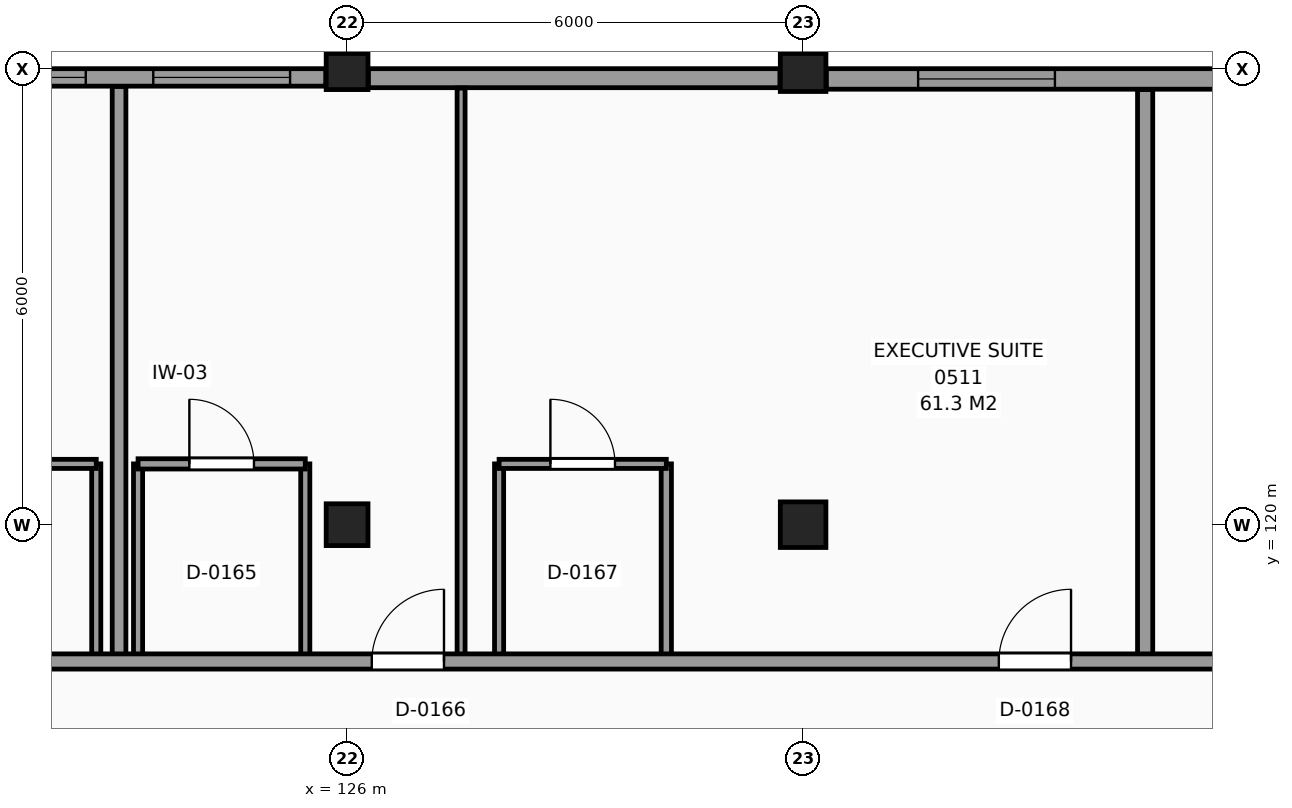
"""IFC4 building model, lengths in metres.
Left out: names, types, materials, properties, quantities, classifications, styles, units other than length and angle.
Written with IfcOpenShell. Run it as: python <this file> out.ifc"""

import sys

from ifc_helpers import new_model, si_unit, direction, frame, frame_2d, origin, origin_2d, place, context, subcontext, project, spatial, rectangle, extrude, element, fill, save


model = new_model("IFC4")
c1 = context("Model", 3, precision=1e-05, world=origin(), true_north=direction((0.0, 1.0)))
c2 = subcontext(c1, "Body", "Model", "MODEL_VIEW")
j1 = project(units=[si_unit("LENGTHUNIT", "METRE"), si_unit("PLANEANGLEUNIT", "RADIAN")], contexts=[c1])
p1 = place(None, origin())
s1 = spatial("IfcSite", under=j1, at=p1, CompositionType="ELEMENT")
p2 = place(p1, origin())
s2 = spatial("IfcBuilding", under=s1, at=p2, CompositionType="ELEMENT")
p3 = place(p2, frame((0.0, 0.0, 24.6)))
s3 = spatial("IfcBuildingStorey", under=s2, at=p3, CompositionType="ELEMENT", Elevation=24.6)
for number, where, z_axis, x_axis in (
    (1, (126.0, 120.0, 0.0), (0.0, 0.0, 1.0), (1.0, 0.0, 0.0)),
    (2, (126.0, 126.0, 0.0), (0.0, 0.0, 1.0), (1.0, 0.0, 0.0)),
):
    element("IfcColumn", number, at=place(p3, frame(where, z_axis=z_axis, x_axis=x_axis)), inside=s3, PredefinedType="COLUMN", context=c2, shape_type="SweptSolid", body=[
        extrude(rectangle(XDim=0.55, YDim=0.55, at=origin_2d()), origin(), (0.0, 0.0, 1.0), 3.6),
    ])
for number, where, z_axis, x_axis in (
    (3, (132.0, 120.0, 0.0), (0.0, 0.0, 1.0), (1.0, 0.0, 0.0)),
    (4, (132.0, 126.0, 0.0), (0.0, 0.0, 1.0), (1.0, 0.0, 0.0)),
):
    element("IfcColumn", number, at=place(p3, frame(where, z_axis=z_axis, x_axis=x_axis)), inside=s3, PredefinedType="COLUMN", context=c2, shape_type="SweptSolid", body=[
        extrude(rectangle(XDim=0.6, YDim=0.6, at=origin_2d()), origin(), (0.0, 0.0, 1.0), 3.6),
    ])
p4 = place(p3, frame((137.72, 125.865, 0.0), z_axis=(0.0, 0.0, 1.0), x_axis=(-1.0, 0.0, 0.0)))
e5 = element("IfcWall", 5, at=p4, inside=s3, PredefinedType="SOLIDWALL", context=c2, shape_type="SweptSolid", body=[
    extrude(rectangle(XDim=5.415, YDim=0.27, at=frame_2d((2.708, 0.0))), origin(), (0.0, 0.0, 1.0), 2.73),
])
p5 = place(p4, frame((2.407, 0.0, 0.8)))
e6 = element("IfcOpeningElement", 6, at=p5, cuts=e5, PredefinedType="OPENING", context=c2, shape_type="SweptSolid", body=[
    extrude(rectangle(XDim=1.8, YDim=1.7, at=frame_2d((0.9, 0.85))), frame((0.0, 0.145, 0.0), z_axis=(0.0, -1.0, 0.0), x_axis=(1.0, 0.0, 0.0)), (0.0, 0.0, 1.0), 0.29),
])
p6 = place(p3, frame((131.695, 125.875, 0.0), z_axis=(0.0, 0.0, 1.0), x_axis=(-1.0, 0.0, 0.0)))
e7 = element("IfcWall", 7, at=p6, inside=s3, PredefinedType="SOLIDWALL", context=c2, shape_type="SweptSolid", body=[
    extrude(rectangle(XDim=5.415, YDim=0.25, at=frame_2d((2.708, 0.0))), origin(), (0.0, 0.0, 1.0), 2.73),
])
p7 = place(p3, frame((125.72, 125.885, 0.0), z_axis=(0.0, 0.0, 1.0), x_axis=(-1.0, 0.0, 0.0)))
e8 = element("IfcWall", 8, at=p7, inside=s3, PredefinedType="SOLIDWALL", context=c2, shape_type="SweptSolid", body=[
    extrude(rectangle(XDim=5.415, YDim=0.23, at=frame_2d((2.708, 0.0))), origin(), (0.0, 0.0, 1.0), 2.73),
])
p8 = place(p7, frame((3.158, 0.0, 0.8)))
e9 = element("IfcOpeningElement", 9, at=p8, cuts=e8, PredefinedType="OPENING", context=c2, shape_type="SweptSolid", body=[
    extrude(rectangle(XDim=1.8, YDim=1.7, at=frame_2d((0.9, 0.85))), frame((0.0, 0.125, 0.0), z_axis=(0.0, -1.0, 0.0), x_axis=(1.0, 0.0, 0.0)), (0.0, 0.0, 1.0), 0.25),
])
p9 = place(p7, frame((0.47, 0.0, 0.8)))
e10 = element("IfcOpeningElement", 10, at=p9, cuts=e8, PredefinedType="OPENING", context=c2, shape_type="SweptSolid", body=[
    extrude(rectangle(XDim=1.8, YDim=1.7, at=frame_2d((0.9, 0.85))), frame((0.0, 0.125, 0.0), z_axis=(0.0, -1.0, 0.0), x_axis=(1.0, 0.0, 0.0)), (0.0, 0.0, 1.0), 0.25),
])
p10 = place(p3, frame((122.7, 118.2, 0.0), z_axis=(0.0, 0.0, 1.0), x_axis=(0.0, 1.0, 0.0)))
e11 = element("IfcWall", 11, at=p10, inside=s3, PredefinedType="PARTITIONING", context=c2, shape_type="SweptSolid", body=[
    extrude(rectangle(XDim=2.6, YDim=0.12, at=frame_2d((1.3, 0.0))), origin(), (0.0, 0.0, 1.0), 3.38),
])
p11 = place(p3, frame((123.0, 118.2, 0.0), z_axis=(0.0, 0.0, 1.0), x_axis=(0.0, 1.0, 0.0)))
e12 = element("IfcWall", 12, at=p11, inside=s3, PredefinedType="PARTITIONING", context=c2, shape_type="SweptSolid", body=[
    extrude(rectangle(XDim=7.565, YDim=0.18, at=frame_2d((3.782, 0.0))), origin(), (0.0, 0.0, 1.0), 3.38),
])
for number, where, z_axis, x_axis in (
    (13, (123.25, 118.2, 0.0), (0.0, 0.0, 1.0), (0.0, 1.0, 0.0)),
    (14, (125.45, 118.2, 0.0), (0.0, 0.0, 1.0), (0.0, 1.0, 0.0)),
):
    element("IfcWall", number, at=place(p3, frame(where, z_axis=z_axis, x_axis=x_axis)), inside=s3, PredefinedType="PARTITIONING", context=c2, shape_type="SweptSolid", body=[
        extrude(rectangle(XDim=2.6, YDim=0.12, at=frame_2d((1.3, 0.0))), origin(), (0.0, 0.0, 1.0), 3.38),
    ])
p12 = place(p3, frame((127.5, 118.2, 0.0), z_axis=(0.0, 0.0, 1.0), x_axis=(0.0, 1.0, 0.0)))
e15 = element("IfcWall", 15, at=p12, inside=s3, PredefinedType="PARTITIONING", context=c2, shape_type="SweptSolid", body=[
    extrude(rectangle(XDim=7.545, YDim=0.105, at=frame_2d((3.772, 0.0))), origin(), (0.0, 0.0, 1.0), 3.38),
])
p13 = place(p3, frame((128.0, 118.2, 0.0), z_axis=(0.0, 0.0, 1.0), x_axis=(0.0, 1.0, 0.0)))
e16 = element("IfcWall", 16, at=p13, inside=s3, PredefinedType="PARTITIONING", context=c2, shape_type="SweptSolid", body=[
    extrude(rectangle(XDim=2.6, YDim=0.12, at=frame_2d((1.3, 0.0))), origin(), (0.0, 0.0, 1.0), 3.38),
])
p14 = place(p3, frame((130.2, 118.2, 0.0), z_axis=(0.0, 0.0, 1.0), x_axis=(0.0, 1.0, 0.0)))
e17 = element("IfcWall", 17, at=p14, inside=s3, PredefinedType="PARTITIONING", context=c2, shape_type="SweptSolid", body=[
    extrude(rectangle(XDim=2.6, YDim=0.135, at=frame_2d((1.3, 0.0))), origin(), (0.0, 0.0, 1.0), 3.38),
])
p15 = place(p3, frame((136.5, 118.2, 0.0), z_axis=(0.0, 0.0, 1.0), x_axis=(0.0, 1.0, 0.0)))
e18 = element("IfcWall", 18, at=p15, inside=s3, PredefinedType="PARTITIONING", context=c2, shape_type="SweptSolid", body=[
    extrude(rectangle(XDim=7.525, YDim=0.2, at=frame_2d((3.763, 0.0))), origin(), (0.0, 0.0, 1.0), 3.38),
])
p16 = place(p3, frame((66.255, 118.2, 0.0), z_axis=(0.0, 0.0, 1.0), x_axis=(1.0, 0.0, 0.0)))
e19 = element("IfcWall", 19, at=p16, inside=s3, PredefinedType="PARTITIONING", context=c2, shape_type="SweptSolid", body=[
    extrude(rectangle(XDim=110.245, YDim=0.2, at=frame_2d((55.123, 0.0))), origin(), (0.0, 0.0, 1.0), 3.38),
])
p17 = place(p16, frame((7.57, 0.0, 0.0)))
e20 = element("IfcOpeningElement", 20, at=p17, cuts=e19, PredefinedType="OPENING", context=c2, shape_type="SweptSolid", body=[
    extrude(rectangle(XDim=0.95, YDim=2.1, at=frame_2d((0.475, 1.05))), frame((0.0, 0.11, 0.0), z_axis=(0.0, -1.0, 0.0), x_axis=(1.0, 0.0, 0.0)), (0.0, 0.0, 1.0), 0.22),
])
p18 = place(p16, frame((12.07, 0.0, 0.0)))
e21 = element("IfcOpeningElement", 21, at=p18, cuts=e19, PredefinedType="OPENING", context=c2, shape_type="SweptSolid", body=[
    extrude(rectangle(XDim=0.95, YDim=2.1, at=frame_2d((0.475, 1.05))), frame((0.0, 0.11, 0.0), z_axis=(0.0, -1.0, 0.0), x_axis=(1.0, 0.0, 0.0)), (0.0, 0.0, 1.0), 0.22),
])
p19 = place(p16, frame((16.27, 0.0, 0.0)))
e22 = element("IfcOpeningElement", 22, at=p19, cuts=e19, PredefinedType="OPENING", context=c2, shape_type="SweptSolid", body=[
    extrude(rectangle(XDim=0.95, YDim=2.1, at=frame_2d((0.475, 1.05))), frame((0.0, 0.11, 0.0), z_axis=(0.0, -1.0, 0.0), x_axis=(1.0, 0.0, 0.0)), (0.0, 0.0, 1.0), 0.22),
])
p20 = place(p16, frame((18.47, 0.0, 0.0)))
e23 = element("IfcOpeningElement", 23, at=p20, cuts=e19, PredefinedType="OPENING", context=c2, shape_type="SweptSolid", body=[
    extrude(rectangle(XDim=0.95, YDim=2.1, at=frame_2d((0.475, 1.05))), frame((0.0, 0.11, 0.0), z_axis=(0.0, -1.0, 0.0), x_axis=(1.0, 0.0, 0.0)), (0.0, 0.0, 1.0), 0.22),
])
p21 = place(p16, frame((32.32, 0.0, 0.0)))
e24 = element("IfcOpeningElement", 24, at=p21, cuts=e19, PredefinedType="OPENING", context=c2, shape_type="SweptSolid", body=[
    extrude(rectangle(XDim=0.95, YDim=2.1, at=frame_2d((0.475, 1.05))), frame((0.0, 0.11, 0.0), z_axis=(0.0, -1.0, 0.0), x_axis=(1.0, 0.0, 0.0)), (0.0, 0.0, 1.0), 0.22),
])
p22 = place(p16, frame((36.47, 0.0, 0.0)))
e25 = element("IfcOpeningElement", 25, at=p22, cuts=e19, PredefinedType="OPENING", context=c2, shape_type="SweptSolid", body=[
    extrude(rectangle(XDim=0.95, YDim=2.1, at=frame_2d((0.475, 1.05))), frame((0.0, 0.11, 0.0), z_axis=(0.0, -1.0, 0.0), x_axis=(1.0, 0.0, 0.0)), (0.0, 0.0, 1.0), 0.22),
])
p23 = place(p16, frame((46.27, 0.0, 0.0)))
e26 = element("IfcOpeningElement", 26, at=p23, cuts=e19, PredefinedType="OPENING", context=c2, shape_type="SweptSolid", body=[
    extrude(rectangle(XDim=0.95, YDim=2.1, at=frame_2d((0.475, 1.05))), frame((0.0, 0.11, 0.0), z_axis=(0.0, -1.0, 0.0), x_axis=(1.0, 0.0, 0.0)), (0.0, 0.0, 1.0), 0.22),
])
p24 = place(p16, frame((48.47, 0.0, 0.0)))
e27 = element("IfcOpeningElement", 27, at=p24, cuts=e19, PredefinedType="OPENING", context=c2, shape_type="SweptSolid", body=[
    extrude(rectangle(XDim=0.95, YDim=2.1, at=frame_2d((0.475, 1.05))), frame((0.0, 0.11, 0.0), z_axis=(0.0, -1.0, 0.0), x_axis=(1.0, 0.0, 0.0)), (0.0, 0.0, 1.0), 0.22),
])
p25 = place(p16, frame((52.87, 0.0, 0.0)))
e28 = element("IfcOpeningElement", 28, at=p25, cuts=e19, PredefinedType="OPENING", context=c2, shape_type="SweptSolid", body=[
    extrude(rectangle(XDim=0.95, YDim=2.1, at=frame_2d((0.475, 1.05))), frame((0.0, 0.11, 0.0), z_axis=(0.0, -1.0, 0.0), x_axis=(1.0, 0.0, 0.0)), (0.0, 0.0, 1.0), 0.22),
])
p26 = place(p16, frame((60.07, 0.0, 0.0)))
e29 = element("IfcOpeningElement", 29, at=p26, cuts=e19, PredefinedType="OPENING", context=c2, shape_type="SweptSolid", body=[
    extrude(rectangle(XDim=0.95, YDim=2.1, at=frame_2d((0.475, 1.05))), frame((0.0, 0.11, 0.0), z_axis=(0.0, -1.0, 0.0), x_axis=(1.0, 0.0, 0.0)), (0.0, 0.0, 1.0), 0.22),
])
p27 = place(p16, frame((68.32, 0.0, 0.0)))
e30 = element("IfcOpeningElement", 30, at=p27, cuts=e19, PredefinedType="OPENING", context=c2, shape_type="SweptSolid", body=[
    extrude(rectangle(XDim=0.95, YDim=2.1, at=frame_2d((0.475, 1.05))), frame((0.0, 0.11, 0.0), z_axis=(0.0, -1.0, 0.0), x_axis=(1.0, 0.0, 0.0)), (0.0, 0.0, 1.0), 0.22),
])
p28 = place(p16, frame((80.32, 0.0, 0.0)))
e31 = element("IfcOpeningElement", 31, at=p28, cuts=e19, PredefinedType="OPENING", context=c2, shape_type="SweptSolid", body=[
    extrude(rectangle(XDim=0.95, YDim=2.1, at=frame_2d((0.475, 1.05))), frame((0.0, 0.11, 0.0), z_axis=(0.0, -1.0, 0.0), x_axis=(1.0, 0.0, 0.0)), (0.0, 0.0, 1.0), 0.22),
])
p29 = place(p16, frame((82.87, 0.0, 0.0)))
e32 = element("IfcOpeningElement", 32, at=p29, cuts=e19, PredefinedType="OPENING", context=c2, shape_type="SweptSolid", body=[
    extrude(rectangle(XDim=0.95, YDim=2.1, at=frame_2d((0.475, 1.05))), frame((0.0, 0.11, 0.0), z_axis=(0.0, -1.0, 0.0), x_axis=(1.0, 0.0, 0.0)), (0.0, 0.0, 1.0), 0.22),
])
p30 = place(p16, frame((90.07, 0.0, 0.0)))
e33 = element("IfcOpeningElement", 33, at=p30, cuts=e19, PredefinedType="OPENING", context=c2, shape_type="SweptSolid", body=[
    extrude(rectangle(XDim=0.95, YDim=2.1, at=frame_2d((0.475, 1.05))), frame((0.0, 0.11, 0.0), z_axis=(0.0, -1.0, 0.0), x_axis=(1.0, 0.0, 0.0)), (0.0, 0.0, 1.0), 0.22),
])
p31 = place(p16, frame((94.27, 0.0, 0.0)))
e34 = element("IfcOpeningElement", 34, at=p31, cuts=e19, PredefinedType="OPENING", context=c2, shape_type="SweptSolid", body=[
    extrude(rectangle(XDim=0.95, YDim=2.1, at=frame_2d((0.475, 1.05))), frame((0.0, 0.11, 0.0), z_axis=(0.0, -1.0, 0.0), x_axis=(1.0, 0.0, 0.0)), (0.0, 0.0, 1.0), 0.22),
])
p32 = place(p16, frame((103.57, 0.0, 0.0)))
e35 = element("IfcOpeningElement", 35, at=p32, cuts=e19, PredefinedType="OPENING", context=c2, shape_type="SweptSolid", body=[
    extrude(rectangle(XDim=0.95, YDim=2.1, at=frame_2d((0.475, 1.05))), frame((0.0, 0.11, 0.0), z_axis=(0.0, -1.0, 0.0), x_axis=(1.0, 0.0, 0.0)), (0.0, 0.0, 1.0), 0.22),
])
p33 = place(p16, frame((104.97, 0.0, 0.0)))
e36 = element("IfcOpeningElement", 36, at=p33, cuts=e19, PredefinedType="OPENING", context=c2, shape_type="SweptSolid", body=[
    extrude(rectangle(XDim=0.95, YDim=2.1, at=frame_2d((0.475, 1.05))), frame((0.0, 0.11, 0.0), z_axis=(0.0, -1.0, 0.0), x_axis=(1.0, 0.0, 0.0)), (0.0, 0.0, 1.0), 0.22),
])
p34 = place(p3, frame((120.5, 120.8, 0.0), z_axis=(0.0, 0.0, 1.0), x_axis=(1.0, 0.0, 0.0)))
e37 = element("IfcWall", 37, at=p34, inside=s3, PredefinedType="PARTITIONING", context=c2, shape_type="SweptSolid", body=[
    extrude(rectangle(XDim=2.2, YDim=0.12, at=frame_2d((1.1, 0.0))), origin(), (0.0, 0.0, 1.0), 3.38),
])
p35 = place(p34, frame((0.675, 0.0, 0.0)))
e38 = element("IfcOpeningElement", 38, at=p35, cuts=e37, PredefinedType="OPENING", context=c2, shape_type="SweptSolid", body=[
    extrude(rectangle(XDim=0.85, YDim=2.1, at=frame_2d((0.425, 1.05))), frame((0.0, 0.07, 0.0), z_axis=(0.0, -1.0, 0.0), x_axis=(1.0, 0.0, 0.0)), (0.0, 0.0, 1.0), 0.14),
])
p36 = place(p3, frame((123.25, 120.8, 0.0), z_axis=(0.0, 0.0, 1.0), x_axis=(1.0, 0.0, 0.0)))
e39 = element("IfcWall", 39, at=p36, inside=s3, PredefinedType="PARTITIONING", context=c2, shape_type="SweptSolid", body=[
    extrude(rectangle(XDim=2.2, YDim=0.135, at=frame_2d((1.1, 0.0))), origin(), (0.0, 0.0, 1.0), 3.38),
])
p37 = place(p36, frame((0.675, 0.0, 0.0)))
e40 = element("IfcOpeningElement", 40, at=p37, cuts=e39, PredefinedType="OPENING", context=c2, shape_type="SweptSolid", body=[
    extrude(rectangle(XDim=0.85, YDim=2.1, at=frame_2d((0.425, 1.05))), frame((0.0, 0.078, 0.0), z_axis=(0.0, -1.0, 0.0), x_axis=(1.0, 0.0, 0.0)), (0.0, 0.0, 1.0), 0.155),
])
p38 = place(p3, frame((128.0, 120.8, 0.0), z_axis=(0.0, 0.0, 1.0), x_axis=(1.0, 0.0, 0.0)))
e41 = element("IfcWall", 41, at=p38, inside=s3, PredefinedType="PARTITIONING", context=c2, shape_type="SweptSolid", body=[
    extrude(rectangle(XDim=2.2, YDim=0.12, at=frame_2d((1.1, 0.0))), origin(), (0.0, 0.0, 1.0), 3.38),
])
p39 = place(p38, frame((0.675, 0.0, 0.0)))
e42 = element("IfcOpeningElement", 42, at=p39, cuts=e41, PredefinedType="OPENING", context=c2, shape_type="SweptSolid", body=[
    extrude(rectangle(XDim=0.85, YDim=2.1, at=frame_2d((0.425, 1.05))), frame((0.0, 0.07, 0.0), z_axis=(0.0, -1.0, 0.0), x_axis=(1.0, 0.0, 0.0)), (0.0, 0.0, 1.0), 0.14),
])
p40 = place(p8, origin())
e43 = element("IfcWindow", 43, at=p40, inside=s3, PartitioningType="SINGLE_PANEL", PredefinedType="WINDOW", context=c2, shape_type="SweptSolid", body=[
    extrude(rectangle(XDim=1.8, YDim=1.7, at=frame_2d((0.9, 0.85))), frame((0.0, 0.03, 0.0), z_axis=(0.0, -1.0, 0.0), x_axis=(1.0, 0.0, 0.0)), (0.0, 0.0, 1.0), 0.06),
])
fill(e9, e43)
p41 = place(p9, origin())
e44 = element("IfcWindow", 44, at=p41, inside=s3, PartitioningType="SINGLE_PANEL", PredefinedType="WINDOW", context=c2, shape_type="SweptSolid", body=[
    extrude(rectangle(XDim=1.8, YDim=1.7, at=frame_2d((0.9, 0.85))), frame((0.0, 0.03, 0.0), z_axis=(0.0, -1.0, 0.0), x_axis=(1.0, 0.0, 0.0)), (0.0, 0.0, 1.0), 0.06),
])
fill(e10, e44)
p42 = place(p5, origin())
e45 = element("IfcWindow", 45, at=p42, inside=s3, PartitioningType="SINGLE_PANEL", PredefinedType="WINDOW", context=c2, shape_type="SweptSolid", body=[
    extrude(rectangle(XDim=1.8, YDim=1.7, at=frame_2d((0.9, 0.85))), frame((0.0, 0.03, 0.0), z_axis=(0.0, -1.0, 0.0), x_axis=(1.0, 0.0, 0.0)), (0.0, 0.0, 1.0), 0.06),
])
fill(e6, e45)
p43 = place(p37, origin())
e46 = element("IfcDoor", 46, at=p43, inside=s3, OperationType="SINGLE_SWING_LEFT", PredefinedType="DOOR", context=c2, shape_type="SweptSolid", body=[
    extrude(rectangle(XDim=0.85, YDim=2.1, at=frame_2d((0.425, 1.05))), frame((0.0, 0.025, 0.0), z_axis=(0.0, -1.0, 0.0), x_axis=(1.0, 0.0, 0.0)), (0.0, 0.0, 1.0), 0.05),
])
fill(e40, e46)
p44 = place(p26, origin())
e47 = element("IfcDoor", 47, at=p44, inside=s3, OperationType="SINGLE_SWING_RIGHT", PredefinedType="DOOR", context=c2, shape_type="SweptSolid", body=[
    extrude(rectangle(XDim=0.95, YDim=2.1, at=frame_2d((0.475, 1.05))), frame((0.0, 0.025, 0.0), z_axis=(0.0, -1.0, 0.0), x_axis=(1.0, 0.0, 0.0)), (0.0, 0.0, 1.0), 0.05),
])
fill(e29, e47)
p45 = place(p39, origin())
e48 = element("IfcDoor", 48, at=p45, inside=s3, OperationType="SINGLE_SWING_LEFT", PredefinedType="DOOR", context=c2, shape_type="SweptSolid", body=[
    extrude(rectangle(XDim=0.85, YDim=2.1, at=frame_2d((0.425, 1.05))), frame((0.0, 0.025, 0.0), z_axis=(0.0, -1.0, 0.0), x_axis=(1.0, 0.0, 0.0)), (0.0, 0.0, 1.0), 0.05),
])
fill(e42, e48)
p46 = place(p27, origin())
e49 = element("IfcDoor", 49, at=p46, inside=s3, OperationType="SINGLE_SWING_RIGHT", PredefinedType="DOOR", context=c2, shape_type="SweptSolid", body=[
    extrude(rectangle(XDim=0.95, YDim=2.1, at=frame_2d((0.475, 1.05))), frame((0.0, 0.025, 0.0), z_axis=(0.0, -1.0, 0.0), x_axis=(1.0, 0.0, 0.0)), (0.0, 0.0, 1.0), 0.05),
])
fill(e30, e49)
save(model, sys.argv[1])
